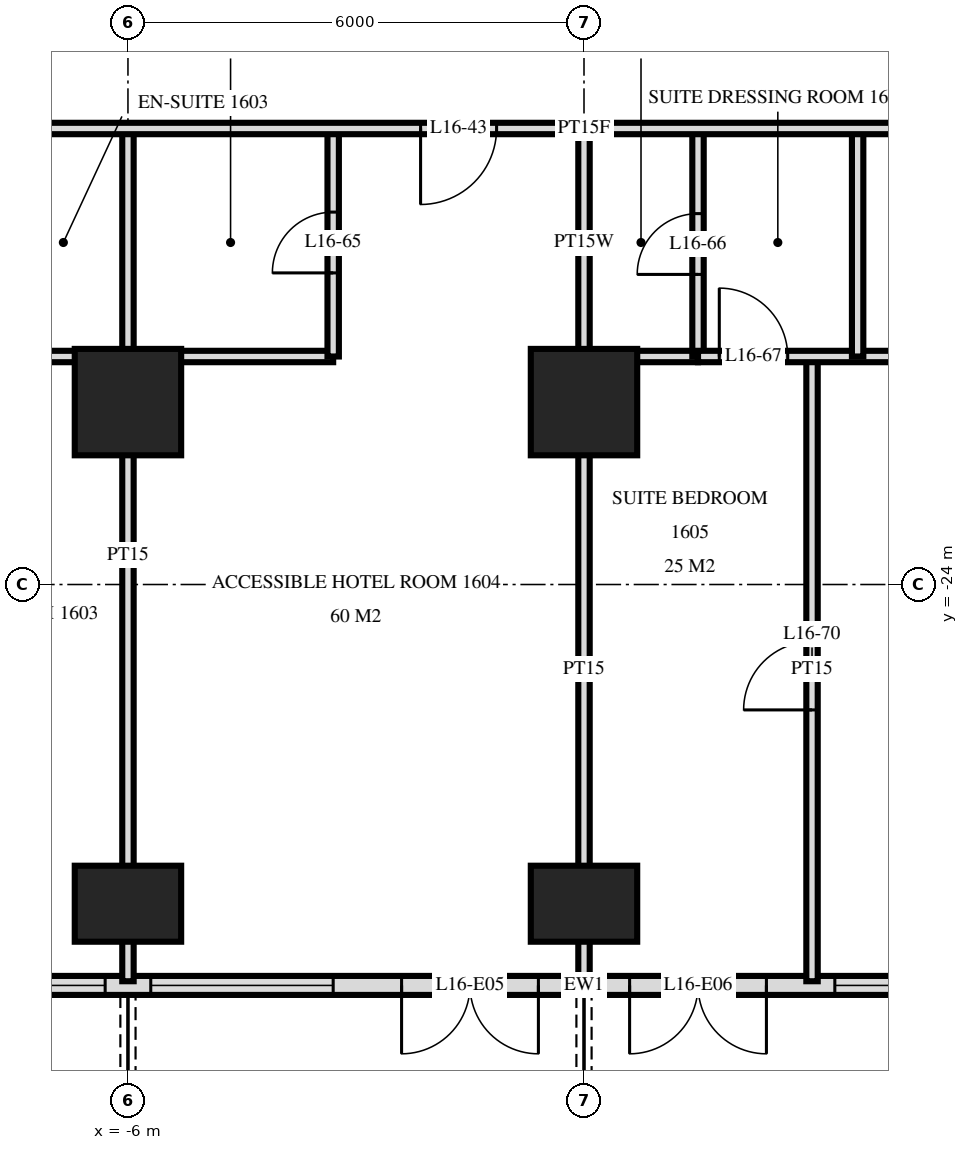
"""IFC4 building model, lengths in metres.
Left out: names, types, materials, properties, quantities, classifications, styles, units other than length and angle.
Written with IfcOpenShell. Run it as: python <this file> out.ifc"""

import sys

from ifc_helpers import new_model, si_unit, direction, frame, frame_2d, origin, origin_2d, place, context, subcontext, project, spatial, rectangle, extrude, element, fill, save


model = new_model("IFC4")
c1 = context("Model", 3, precision=1e-05, world=origin(), true_north=direction((0.0, 1.0)))
c2 = subcontext(c1, "Body", "Model", "MODEL_VIEW")
j1 = project(units=[si_unit("LENGTHUNIT", "METRE"), si_unit("PLANEANGLEUNIT", "RADIAN")], contexts=[c1])
p1 = place(None, origin())
s1 = spatial("IfcSite", under=j1, at=p1, CompositionType="ELEMENT")
p2 = place(p1, origin())
s2 = spatial("IfcBuilding", under=s1, at=p2, CompositionType="ELEMENT")
p3 = place(p2, frame((0.0, 0.0, 67.2)))
s3 = spatial("IfcBuildingStorey", under=s2, at=p3, CompositionType="ELEMENT", Elevation=67.2)
p4 = place(p3, frame((-6.0, -28.2, 0.0), z_axis=(0.0, 0.0, 1.0), x_axis=(1.0, 0.0, 0.0)))
e1 = element("IfcColumn", 1, at=p4, inside=s3, PredefinedType="COLUMN", context=c2, shape_type="SweptSolid", body=[
    extrude(rectangle(XDim=1.4, YDim=1.0, at=origin_2d()), origin(), (0.0, 0.0, 1.0), 3.6),
])
p5 = place(p3, frame((-6.0, -21.6, 0.0), z_axis=(0.0, 0.0, 1.0), x_axis=(1.0, 0.0, 0.0)))
e2 = element("IfcColumn", 2, at=p5, inside=s3, PredefinedType="COLUMN", context=c2, shape_type="SweptSolid", body=[
    extrude(rectangle(XDim=1.4, YDim=1.4, at=origin_2d()), origin(), (0.0, 0.0, 1.0), 3.6),
])
p6 = place(p3, frame((0.0, -28.2, 0.0), z_axis=(0.0, 0.0, 1.0), x_axis=(1.0, 0.0, 0.0)))
e3 = element("IfcColumn", 3, at=p6, inside=s3, PredefinedType="COLUMN", context=c2, shape_type="SweptSolid", body=[
    extrude(rectangle(XDim=1.4, YDim=1.0, at=origin_2d()), origin(), (0.0, 0.0, 1.0), 3.6),
])
p7 = place(p3, frame((0.0, -21.6, 0.0), z_axis=(0.0, 0.0, 1.0), x_axis=(1.0, 0.0, 0.0)))
e4 = element("IfcColumn", 4, at=p7, inside=s3, PredefinedType="COLUMN", context=c2, shape_type="SweptSolid", body=[
    extrude(rectangle(XDim=1.4, YDim=1.4, at=origin_2d()), origin(), (0.0, 0.0, 1.0), 3.6),
])
p8 = place(p3, frame((-28.775, -29.275, 0.0), z_axis=(0.0, 0.0, 1.0), x_axis=(1.0, 0.0, 0.0)))
e5 = element("IfcWall", 5, at=p8, inside=s3, PredefinedType="SOLIDWALL", context=c2, shape_type="SweptSolid", body=[
    extrude(rectangle(XDim=57.551, YDim=0.25, at=frame_2d((28.775, 0.0))), origin(), (0.0, 0.0, 1.0), 3.32),
])
p9 = place(p8, frame((0.575, 0.0, 0.0)))
e6 = element("IfcOpeningElement", 6, at=p9, cuts=e5, PredefinedType="OPENING", context=c2, shape_type="SweptSolid", body=[
    extrude(rectangle(XDim=1.8, YDim=2.4, at=frame_2d((0.9, 1.2))), frame((0.0, 0.135, 0.0), z_axis=(0.0, -1.0, 0.0), x_axis=(1.0, 0.0, 0.0)), (0.0, 0.0, 1.0), 0.27),
])
p10 = place(p8, frame((5.075, 0.0, 0.3)))
e7 = element("IfcOpeningElement", 7, at=p10, cuts=e5, PredefinedType="OPENING", context=c2, shape_type="SweptSolid", body=[
    extrude(rectangle(XDim=2.4, YDim=2.1, at=frame_2d((1.2, 1.05))), frame((0.0, 0.135, 0.0), z_axis=(0.0, -1.0, 0.0), x_axis=(1.0, 0.0, 0.0)), (0.0, 0.0, 1.0), 0.27),
])
p11 = place(p8, frame((8.375, 0.0, 0.0)))
e8 = element("IfcOpeningElement", 8, at=p11, cuts=e5, PredefinedType="OPENING", context=c2, shape_type="SweptSolid", body=[
    extrude(rectangle(XDim=1.8, YDim=2.4, at=frame_2d((0.9, 1.2))), frame((0.0, 0.135, 0.0), z_axis=(0.0, -1.0, 0.0), x_axis=(1.0, 0.0, 0.0)), (0.0, 0.0, 1.0), 0.27),
])
p12 = place(p8, frame((11.375, 0.0, 0.0)))
e9 = element("IfcOpeningElement", 9, at=p12, cuts=e5, PredefinedType="OPENING", context=c2, shape_type="SweptSolid", body=[
    extrude(rectangle(XDim=1.8, YDim=2.4, at=frame_2d((0.9, 1.2))), frame((0.0, 0.135, 0.0), z_axis=(0.0, -1.0, 0.0), x_axis=(1.0, 0.0, 0.0)), (0.0, 0.0, 1.0), 0.27),
])
p13 = place(p8, frame((14.075, 0.0, 0.3)))
e10 = element("IfcOpeningElement", 10, at=p13, cuts=e5, PredefinedType="OPENING", context=c2, shape_type="SweptSolid", body=[
    extrude(rectangle(XDim=2.4, YDim=2.1, at=frame_2d((1.2, 1.05))), frame((0.0, 0.135, 0.0), z_axis=(0.0, -1.0, 0.0), x_axis=(1.0, 0.0, 0.0)), (0.0, 0.0, 1.0), 0.27),
])
p14 = place(p8, frame((17.375, 0.0, 0.0)))
e11 = element("IfcOpeningElement", 11, at=p14, cuts=e5, PredefinedType="OPENING", context=c2, shape_type="SweptSolid", body=[
    extrude(rectangle(XDim=1.8, YDim=2.4, at=frame_2d((0.9, 1.2))), frame((0.0, 0.135, 0.0), z_axis=(0.0, -1.0, 0.0), x_axis=(1.0, 0.0, 0.0)), (0.0, 0.0, 1.0), 0.27),
])
p15 = place(p8, frame((20.075, 0.0, 0.3)))
e12 = element("IfcOpeningElement", 12, at=p15, cuts=e5, PredefinedType="OPENING", context=c2, shape_type="SweptSolid", body=[
    extrude(rectangle(XDim=2.4, YDim=2.1, at=frame_2d((1.2, 1.05))), frame((0.0, 0.135, 0.0), z_axis=(0.0, -1.0, 0.0), x_axis=(1.0, 0.0, 0.0)), (0.0, 0.0, 1.0), 0.27),
])
p16 = place(p8, frame((23.075, 0.0, 0.3)))
e13 = element("IfcOpeningElement", 13, at=p16, cuts=e5, PredefinedType="OPENING", context=c2, shape_type="SweptSolid", body=[
    extrude(rectangle(XDim=2.4, YDim=2.1, at=frame_2d((1.2, 1.05))), frame((0.0, 0.135, 0.0), z_axis=(0.0, -1.0, 0.0), x_axis=(1.0, 0.0, 0.0)), (0.0, 0.0, 1.0), 0.27),
])
p17 = place(p8, frame((26.375, 0.0, 0.0)))
e14 = element("IfcOpeningElement", 14, at=p17, cuts=e5, PredefinedType="OPENING", context=c2, shape_type="SweptSolid", body=[
    extrude(rectangle(XDim=1.8, YDim=2.4, at=frame_2d((0.9, 1.2))), frame((0.0, 0.135, 0.0), z_axis=(0.0, -1.0, 0.0), x_axis=(1.0, 0.0, 0.0)), (0.0, 0.0, 1.0), 0.27),
])
p18 = place(p8, frame((29.375, 0.0, 0.0)))
e15 = element("IfcOpeningElement", 15, at=p18, cuts=e5, PredefinedType="OPENING", context=c2, shape_type="SweptSolid", body=[
    extrude(rectangle(XDim=1.8, YDim=2.4, at=frame_2d((0.9, 1.2))), frame((0.0, 0.135, 0.0), z_axis=(0.0, -1.0, 0.0), x_axis=(1.0, 0.0, 0.0)), (0.0, 0.0, 1.0), 0.27),
])
p19 = place(p8, frame((32.075, 0.0, 0.3)))
e16 = element("IfcOpeningElement", 16, at=p19, cuts=e5, PredefinedType="OPENING", context=c2, shape_type="SweptSolid", body=[
    extrude(rectangle(XDim=2.4, YDim=2.1, at=frame_2d((1.2, 1.05))), frame((0.0, 0.135, 0.0), z_axis=(0.0, -1.0, 0.0), x_axis=(1.0, 0.0, 0.0)), (0.0, 0.0, 1.0), 0.27),
])
p20 = place(p8, frame((35.375, 0.0, 0.0)))
e17 = element("IfcOpeningElement", 17, at=p20, cuts=e5, PredefinedType="OPENING", context=c2, shape_type="SweptSolid", body=[
    extrude(rectangle(XDim=1.8, YDim=2.4, at=frame_2d((0.9, 1.2))), frame((0.0, 0.135, 0.0), z_axis=(0.0, -1.0, 0.0), x_axis=(1.0, 0.0, 0.0)), (0.0, 0.0, 1.0), 0.27),
])
p21 = place(p8, frame((38.075, 0.0, 0.3)))
e18 = element("IfcOpeningElement", 18, at=p21, cuts=e5, PredefinedType="OPENING", context=c2, shape_type="SweptSolid", body=[
    extrude(rectangle(XDim=2.4, YDim=2.1, at=frame_2d((1.2, 1.05))), frame((0.0, 0.135, 0.0), z_axis=(0.0, -1.0, 0.0), x_axis=(1.0, 0.0, 0.0)), (0.0, 0.0, 1.0), 0.27),
])
p22 = place(p8, frame((41.075, 0.0, 0.3)))
e19 = element("IfcOpeningElement", 19, at=p22, cuts=e5, PredefinedType="OPENING", context=c2, shape_type="SweptSolid", body=[
    extrude(rectangle(XDim=2.4, YDim=2.1, at=frame_2d((1.2, 1.05))), frame((0.0, 0.135, 0.0), z_axis=(0.0, -1.0, 0.0), x_axis=(1.0, 0.0, 0.0)), (0.0, 0.0, 1.0), 0.27),
])
p23 = place(p8, frame((44.375, 0.0, 0.0)))
e20 = element("IfcOpeningElement", 20, at=p23, cuts=e5, PredefinedType="OPENING", context=c2, shape_type="SweptSolid", body=[
    extrude(rectangle(XDim=1.8, YDim=2.4, at=frame_2d((0.9, 1.2))), frame((0.0, 0.135, 0.0), z_axis=(0.0, -1.0, 0.0), x_axis=(1.0, 0.0, 0.0)), (0.0, 0.0, 1.0), 0.27),
])
p24 = place(p8, frame((47.075, 0.0, 0.3)))
e21 = element("IfcOpeningElement", 21, at=p24, cuts=e5, PredefinedType="OPENING", context=c2, shape_type="SweptSolid", body=[
    extrude(rectangle(XDim=2.4, YDim=2.1, at=frame_2d((1.2, 1.05))), frame((0.0, 0.135, 0.0), z_axis=(0.0, -1.0, 0.0), x_axis=(1.0, 0.0, 0.0)), (0.0, 0.0, 1.0), 0.27),
])
p25 = place(p8, frame((50.375, 0.0, 0.0)))
e22 = element("IfcOpeningElement", 22, at=p25, cuts=e5, PredefinedType="OPENING", context=c2, shape_type="SweptSolid", body=[
    extrude(rectangle(XDim=1.8, YDim=2.4, at=frame_2d((0.9, 1.2))), frame((0.0, 0.135, 0.0), z_axis=(0.0, -1.0, 0.0), x_axis=(1.0, 0.0, 0.0)), (0.0, 0.0, 1.0), 0.27),
])
p26 = place(p8, frame((53.375, 0.0, 0.0)))
e23 = element("IfcOpeningElement", 23, at=p26, cuts=e5, PredefinedType="OPENING", context=c2, shape_type="SweptSolid", body=[
    extrude(rectangle(XDim=1.8, YDim=2.4, at=frame_2d((0.9, 1.2))), frame((0.0, 0.135, 0.0), z_axis=(0.0, -1.0, 0.0), x_axis=(1.0, 0.0, 0.0)), (0.0, 0.0, 1.0), 0.27),
])
p27 = place(p3, frame((3.6, -21.0, 0.0), z_axis=(0.0, 0.0, 1.0), x_axis=(0.0, 1.0, 0.0)))
e24 = element("IfcWall", 24, at=p27, inside=s3, PredefinedType="PARTITIONING", context=c2, shape_type="SweptSolid", body=[
    extrude(rectangle(XDim=3.0, YDim=0.15, at=frame_2d((1.5, 0.0))), origin(), (0.0, 0.0, 1.0), 3.32),
])
p28 = place(p3, frame((3.0, -29.22, 0.0), z_axis=(0.0, 0.0, 1.0), x_axis=(0.0, 1.0, 0.0)))
e25 = element("IfcWall", 25, at=p28, inside=s3, PredefinedType="PARTITIONING", context=c2, shape_type="SweptSolid", body=[
    extrude(rectangle(XDim=8.22, YDim=0.15, at=frame_2d((4.11, 0.0))), origin(), (0.0, 0.0, 1.0), 3.32),
])
p29 = place(p28, frame((3.57, 0.0, 0.0)))
e26 = element("IfcOpeningElement", 26, at=p29, cuts=e25, PredefinedType="OPENING", context=c2, shape_type="SweptSolid", body=[
    extrude(rectangle(XDim=0.9, YDim=2.1, at=frame_2d((0.45, 1.05))), frame((0.0, 0.085, 0.0), z_axis=(0.0, -1.0, 0.0), x_axis=(1.0, 0.0, 0.0)), (0.0, 0.0, 1.0), 0.17),
])
p30 = place(p3, frame((1.5, -21.0, 0.0), z_axis=(0.0, 0.0, 1.0), x_axis=(0.0, 1.0, 0.0)))
e27 = element("IfcWall", 27, at=p30, inside=s3, PredefinedType="PLUMBINGWALL", context=c2, shape_type="SweptSolid", body=[
    extrude(rectangle(XDim=3.0, YDim=0.15, at=frame_2d((1.5, 0.0))), origin(), (0.0, 0.0, 1.0), 3.32),
])
p31 = place(p30, frame((1.08, 0.0, 0.0)))
e28 = element("IfcOpeningElement", 28, at=p31, cuts=e27, PredefinedType="OPENING", context=c2, shape_type="SweptSolid", body=[
    extrude(rectangle(XDim=0.8, YDim=2.1, at=frame_2d((0.4, 1.05))), frame((0.0, 0.085, 0.0), z_axis=(0.0, -1.0, 0.0), x_axis=(1.0, 0.0, 0.0)), (0.0, 0.0, 1.0), 0.17),
])
p32 = place(p3, frame((0.0, -29.22, 0.0), z_axis=(0.0, 0.0, 1.0), x_axis=(0.0, 1.0, 0.0)))
e29 = element("IfcWall", 29, at=p32, inside=s3, PredefinedType="PARTITIONING", context=c2, shape_type="SweptSolid", body=[
    extrude(rectangle(XDim=8.22, YDim=0.15, at=frame_2d((4.11, 0.0))), origin(), (0.0, 0.0, 1.0), 3.32),
])
p33 = place(p3, frame((0.0, -21.0, 0.0), z_axis=(0.0, 0.0, 1.0), x_axis=(0.0, 1.0, 0.0)))
e30 = element("IfcWall", 30, at=p33, inside=s3, PredefinedType="PLUMBINGWALL", context=c2, shape_type="SweptSolid", body=[
    extrude(rectangle(XDim=3.0, YDim=0.15, at=frame_2d((1.5, 0.0))), origin(), (0.0, 0.0, 1.0), 3.32),
])
p34 = place(p3, frame((-3.3, -21.0, 0.0), z_axis=(0.0, 0.0, 1.0), x_axis=(0.0, 1.0, 0.0)))
e31 = element("IfcWall", 31, at=p34, inside=s3, PredefinedType="PARTITIONING", context=c2, shape_type="SweptSolid", body=[
    extrude(rectangle(XDim=3.0, YDim=0.15, at=frame_2d((1.5, 0.0))), origin(), (0.0, 0.0, 1.0), 3.32),
])
p35 = place(p34, frame((1.1, 0.0, 0.0)))
e32 = element("IfcOpeningElement", 32, at=p35, cuts=e31, PredefinedType="OPENING", context=c2, shape_type="SweptSolid", body=[
    extrude(rectangle(XDim=0.8, YDim=2.1, at=frame_2d((0.4, 1.05))), frame((0.0, 0.085, 0.0), z_axis=(0.0, -1.0, 0.0), x_axis=(1.0, 0.0, 0.0)), (0.0, 0.0, 1.0), 0.17),
])
p36 = place(p3, frame((-6.0, -29.22, 0.0), z_axis=(0.0, 0.0, 1.0), x_axis=(0.0, 1.0, 0.0)))
e33 = element("IfcWall", 33, at=p36, inside=s3, PredefinedType="PARTITIONING", context=c2, shape_type="SweptSolid", body=[
    extrude(rectangle(XDim=11.22, YDim=0.15, at=frame_2d((5.61, 0.0))), origin(), (0.0, 0.0, 1.0), 3.32),
])
p37 = place(p3, frame((-7.7, -21.0, 0.0), z_axis=(0.0, 0.0, 1.0), x_axis=(1.0, 0.0, 0.0)))
e34 = element("IfcWall", 34, at=p37, inside=s3, PredefinedType="PARTITIONING", context=c2, shape_type="SweptSolid", body=[
    extrude(rectangle(XDim=4.4, YDim=0.15, at=frame_2d((2.2, 0.0))), origin(), (0.0, 0.0, 1.0), 3.32),
])
p38 = place(p3, frame((1.5, -21.0, 0.0), z_axis=(0.0, 0.0, 1.0), x_axis=(1.0, 0.0, 0.0)))
e35 = element("IfcWall", 35, at=p38, inside=s3, PredefinedType="PARTITIONING", context=c2, shape_type="SweptSolid", body=[
    extrude(rectangle(XDim=5.1, YDim=0.15, at=frame_2d((2.55, 0.0))), origin(), (0.0, 0.0, 1.0), 3.32),
])
p39 = place(p38, frame((0.28, 0.0, 0.0)))
e36 = element("IfcOpeningElement", 36, at=p39, cuts=e35, PredefinedType="OPENING", context=c2, shape_type="SweptSolid", body=[
    extrude(rectangle(XDim=0.9, YDim=2.1, at=frame_2d((0.45, 1.05))), frame((0.0, 0.085, 0.0), z_axis=(0.0, -1.0, 0.0), x_axis=(1.0, 0.0, 0.0)), (0.0, 0.0, 1.0), 0.17),
])
p40 = place(p3, frame((0.0, -21.0, 0.0), z_axis=(0.0, 0.0, 1.0), x_axis=(1.0, 0.0, 0.0)))
e37 = element("IfcWall", 37, at=p40, inside=s3, PredefinedType="PLUMBINGWALL", context=c2, shape_type="SweptSolid", body=[
    extrude(rectangle(XDim=1.5, YDim=0.15, at=frame_2d((0.75, 0.0))), origin(), (0.0, 0.0, 1.0), 3.32),
])
p41 = place(p3, frame((-33.12, -18.0, 0.0), z_axis=(0.0, 0.0, 1.0), x_axis=(1.0, 0.0, 0.0)))
e38 = element("IfcWall", 38, at=p41, inside=s3, PredefinedType="PARTITIONING", context=c2, shape_type="SweptSolid", body=[
    extrude(rectangle(XDim=66.24, YDim=0.15, at=frame_2d((33.12, 0.0))), origin(), (0.0, 0.0, 1.0), 3.32),
])
p42 = place(p41, frame((15.27, 0.0, 0.0)))
e39 = element("IfcOpeningElement", 39, at=p42, cuts=e38, PredefinedType="OPENING", context=c2, shape_type="SweptSolid", body=[
    extrude(rectangle(XDim=1.0, YDim=2.1, at=frame_2d((0.5, 1.05))), frame((0.0, 0.085, 0.0), z_axis=(0.0, -1.0, 0.0), x_axis=(1.0, 0.0, 0.0)), (0.0, 0.0, 1.0), 0.17),
])
p43 = place(p41, frame((21.22, 0.0, 0.0)))
e40 = element("IfcOpeningElement", 40, at=p43, cuts=e38, PredefinedType="OPENING", context=c2, shape_type="SweptSolid", body=[
    extrude(rectangle(XDim=1.0, YDim=2.1, at=frame_2d((0.5, 1.05))), frame((0.0, 0.085, 0.0), z_axis=(0.0, -1.0, 0.0), x_axis=(1.0, 0.0, 0.0)), (0.0, 0.0, 1.0), 0.17),
])
p44 = place(p41, frame((24.27, 0.0, 0.0)))
e41 = element("IfcOpeningElement", 41, at=p44, cuts=e38, PredefinedType="OPENING", context=c2, shape_type="SweptSolid", body=[
    extrude(rectangle(XDim=1.0, YDim=2.1, at=frame_2d((0.5, 1.05))), frame((0.0, 0.085, 0.0), z_axis=(0.0, -1.0, 0.0), x_axis=(1.0, 0.0, 0.0)), (0.0, 0.0, 1.0), 0.17),
])
p45 = place(p41, frame((30.97, 0.0, 0.0)))
e42 = element("IfcOpeningElement", 42, at=p45, cuts=e38, PredefinedType="OPENING", context=c2, shape_type="SweptSolid", body=[
    extrude(rectangle(XDim=1.0, YDim=2.1, at=frame_2d((0.5, 1.05))), frame((0.0, 0.085, 0.0), z_axis=(0.0, -1.0, 0.0), x_axis=(1.0, 0.0, 0.0)), (0.0, 0.0, 1.0), 0.17),
])
p46 = place(p41, frame((40.42, 0.0, 0.0)))
e43 = element("IfcOpeningElement", 43, at=p46, cuts=e38, PredefinedType="OPENING", context=c2, shape_type="SweptSolid", body=[
    extrude(rectangle(XDim=1.0, YDim=2.1, at=frame_2d((0.5, 1.05))), frame((0.0, 0.085, 0.0), z_axis=(0.0, -1.0, 0.0), x_axis=(1.0, 0.0, 0.0)), (0.0, 0.0, 1.0), 0.17),
])
p47 = place(p41, frame((43.97, 0.0, 0.0)))
e44 = element("IfcOpeningElement", 44, at=p47, cuts=e38, PredefinedType="OPENING", context=c2, shape_type="SweptSolid", body=[
    extrude(rectangle(XDim=1.0, YDim=2.1, at=frame_2d((0.5, 1.05))), frame((0.0, 0.085, 0.0), z_axis=(0.0, -1.0, 0.0), x_axis=(1.0, 0.0, 0.0)), (0.0, 0.0, 1.0), 0.17),
])
p48 = place(p41, frame((45.52, 0.0, 0.0)))
e45 = element("IfcOpeningElement", 45, at=p48, cuts=e38, PredefinedType="OPENING", context=c2, shape_type="SweptSolid", body=[
    extrude(rectangle(XDim=1.0, YDim=2.1, at=frame_2d((0.5, 1.05))), frame((0.0, 0.085, 0.0), z_axis=(0.0, -1.0, 0.0), x_axis=(1.0, 0.0, 0.0)), (0.0, 0.0, 1.0), 0.17),
])
p49 = place(p41, frame((52.97, 0.0, 0.0)))
e46 = element("IfcOpeningElement", 46, at=p49, cuts=e38, PredefinedType="OPENING", context=c2, shape_type="SweptSolid", body=[
    extrude(rectangle(XDim=1.0, YDim=2.1, at=frame_2d((0.5, 1.05))), frame((0.0, 0.085, 0.0), z_axis=(0.0, -1.0, 0.0), x_axis=(1.0, 0.0, 0.0)), (0.0, 0.0, 1.0), 0.17),
])
p50 = place(p41, frame((54.27, 0.0, 0.0)))
e47 = element("IfcOpeningElement", 47, at=p50, cuts=e38, PredefinedType="OPENING", context=c2, shape_type="SweptSolid", body=[
    extrude(rectangle(XDim=1.0, YDim=2.1, at=frame_2d((0.5, 1.05))), frame((0.0, 0.085, 0.0), z_axis=(0.0, -1.0, 0.0), x_axis=(1.0, 0.0, 0.0)), (0.0, 0.0, 1.0), 0.17),
])
p51 = place(p41, frame((13.42, 0.0, 0.0)))
e48 = element("IfcOpeningElement", 48, at=p51, cuts=e38, PredefinedType="OPENING", context=c2, shape_type="SweptSolid", body=[
    extrude(rectangle(XDim=1.0, YDim=2.1, at=frame_2d((0.5, 1.05))), frame((0.0, 0.085, 0.0), z_axis=(0.0, -1.0, 0.0), x_axis=(1.0, 0.0, 0.0)), (0.0, 0.0, 1.0), 0.17),
])
p52 = place(p41, frame((60.82, 0.0, 0.0)))
e49 = element("IfcOpeningElement", 49, at=p52, cuts=e38, PredefinedType="OPENING", context=c2, shape_type="SweptSolid", body=[
    extrude(rectangle(XDim=1.0, YDim=2.1, at=frame_2d((0.5, 1.05))), frame((0.0, 0.085, 0.0), z_axis=(0.0, -1.0, 0.0), x_axis=(1.0, 0.0, 0.0)), (0.0, 0.0, 1.0), 0.17),
])
p53 = place(p15, origin())
e50 = element("IfcWindow", 50, at=p53, inside=s3, PartitioningType="SINGLE_PANEL", PredefinedType="WINDOW", context=c2, shape_type="SweptSolid", body=[
    extrude(rectangle(XDim=2.4, YDim=2.1, at=frame_2d((1.2, 1.05))), frame((0.0, 0.03, 0.0), z_axis=(0.0, -1.0, 0.0), x_axis=(1.0, 0.0, 0.0)), (0.0, 0.0, 1.0), 0.06),
])
fill(e12, e50)
p54 = place(p16, origin())
e51 = element("IfcWindow", 51, at=p54, inside=s3, PartitioningType="SINGLE_PANEL", PredefinedType="WINDOW", context=c2, shape_type="SweptSolid", body=[
    extrude(rectangle(XDim=2.4, YDim=2.1, at=frame_2d((1.2, 1.05))), frame((0.0, 0.03, 0.0), z_axis=(0.0, -1.0, 0.0), x_axis=(1.0, 0.0, 0.0)), (0.0, 0.0, 1.0), 0.06),
])
fill(e13, e51)
p55 = place(p17, frame((0.9, 0.0, 0.0), z_axis=(0.0, 0.0, 1.0), x_axis=(-1.0, 0.0, 0.0)))
e52 = element("IfcDoor", 52, at=p55, inside=s3, OperationType="DOUBLE_DOOR_SINGLE_SWING", PredefinedType="DOOR", context=c2, shape_type="SweptSolid", body=[
    extrude(rectangle(XDim=1.8, YDim=2.4, at=frame_2d((0.0, 1.2))), frame((0.0, -0.025, 0.0), z_axis=(0.0, 1.0, 0.0), x_axis=(-1.0, 0.0, 0.0)), (0.0, 0.0, 1.0), 0.05),
])
fill(e14, e52)
p56 = place(p18, frame((0.9, 0.0, 0.0), z_axis=(0.0, 0.0, 1.0), x_axis=(-1.0, 0.0, 0.0)))
e53 = element("IfcDoor", 53, at=p56, inside=s3, OperationType="DOUBLE_DOOR_SINGLE_SWING", PredefinedType="DOOR", context=c2, shape_type="SweptSolid", body=[
    extrude(rectangle(XDim=1.8, YDim=2.4, at=frame_2d((0.0, 1.2))), frame((0.0, -0.025, 0.0), z_axis=(0.0, 1.0, 0.0), x_axis=(-1.0, 0.0, 0.0)), (0.0, 0.0, 1.0), 0.05),
])
fill(e15, e53)
p57 = place(p19, origin())
e54 = element("IfcWindow", 54, at=p57, inside=s3, PartitioningType="SINGLE_PANEL", PredefinedType="WINDOW", context=c2, shape_type="SweptSolid", body=[
    extrude(rectangle(XDim=2.4, YDim=2.1, at=frame_2d((1.2, 1.05))), frame((0.0, 0.03, 0.0), z_axis=(0.0, -1.0, 0.0), x_axis=(1.0, 0.0, 0.0)), (0.0, 0.0, 1.0), 0.06),
])
fill(e16, e54)
p58 = place(p45, frame((0.5, 0.0, 0.0), z_axis=(0.0, 0.0, 1.0), x_axis=(-1.0, 0.0, 0.0)))
e55 = element("IfcDoor", 55, at=p58, inside=s3, OperationType="SINGLE_SWING_LEFT", PredefinedType="DOOR", context=c2, shape_type="SweptSolid", body=[
    extrude(rectangle(XDim=1.0, YDim=2.1, at=frame_2d((0.0, 1.05))), frame((0.0, -0.025, 0.0), z_axis=(0.0, 1.0, 0.0), x_axis=(-1.0, 0.0, 0.0)), (0.0, 0.0, 1.0), 0.05),
])
fill(e42, e55)
p59 = place(p35, origin())
e56 = element("IfcDoor", 56, at=p59, inside=s3, OperationType="SINGLE_SWING_RIGHT", PredefinedType="DOOR", context=c2, shape_type="SweptSolid", body=[
    extrude(rectangle(XDim=0.8, YDim=2.1, at=frame_2d((0.4, 1.05))), frame((0.0, 0.025, 0.0), z_axis=(0.0, -1.0, 0.0), x_axis=(1.0, 0.0, 0.0)), (0.0, 0.0, 1.0), 0.05),
])
fill(e32, e56)
p60 = place(p31, origin())
e57 = element("IfcDoor", 57, at=p60, inside=s3, OperationType="SINGLE_SWING_RIGHT", PredefinedType="DOOR", context=c2, shape_type="SweptSolid", body=[
    extrude(rectangle(XDim=0.8, YDim=2.1, at=frame_2d((0.4, 1.05))), frame((0.0, 0.025, 0.0), z_axis=(0.0, -1.0, 0.0), x_axis=(1.0, 0.0, 0.0)), (0.0, 0.0, 1.0), 0.05),
])
fill(e28, e57)
p61 = place(p39, origin())
e58 = element("IfcDoor", 58, at=p61, inside=s3, OperationType="SINGLE_SWING_RIGHT", PredefinedType="DOOR", context=c2, shape_type="SweptSolid", body=[
    extrude(rectangle(XDim=0.9, YDim=2.1, at=frame_2d((0.45, 1.05))), frame((0.0, 0.025, 0.0), z_axis=(0.0, -1.0, 0.0), x_axis=(1.0, 0.0, 0.0)), (0.0, 0.0, 1.0), 0.05),
])
fill(e36, e58)
p62 = place(p29, origin())
e59 = element("IfcDoor", 59, at=p62, inside=s3, OperationType="SINGLE_SWING_RIGHT", PredefinedType="DOOR", context=c2, shape_type="SweptSolid", body=[
    extrude(rectangle(XDim=0.9, YDim=2.1, at=frame_2d((0.45, 1.05))), frame((0.0, 0.025, 0.0), z_axis=(0.0, -1.0, 0.0), x_axis=(1.0, 0.0, 0.0)), (0.0, 0.0, 1.0), 0.05),
])
fill(e26, e59)
save(model, sys.argv[1])
